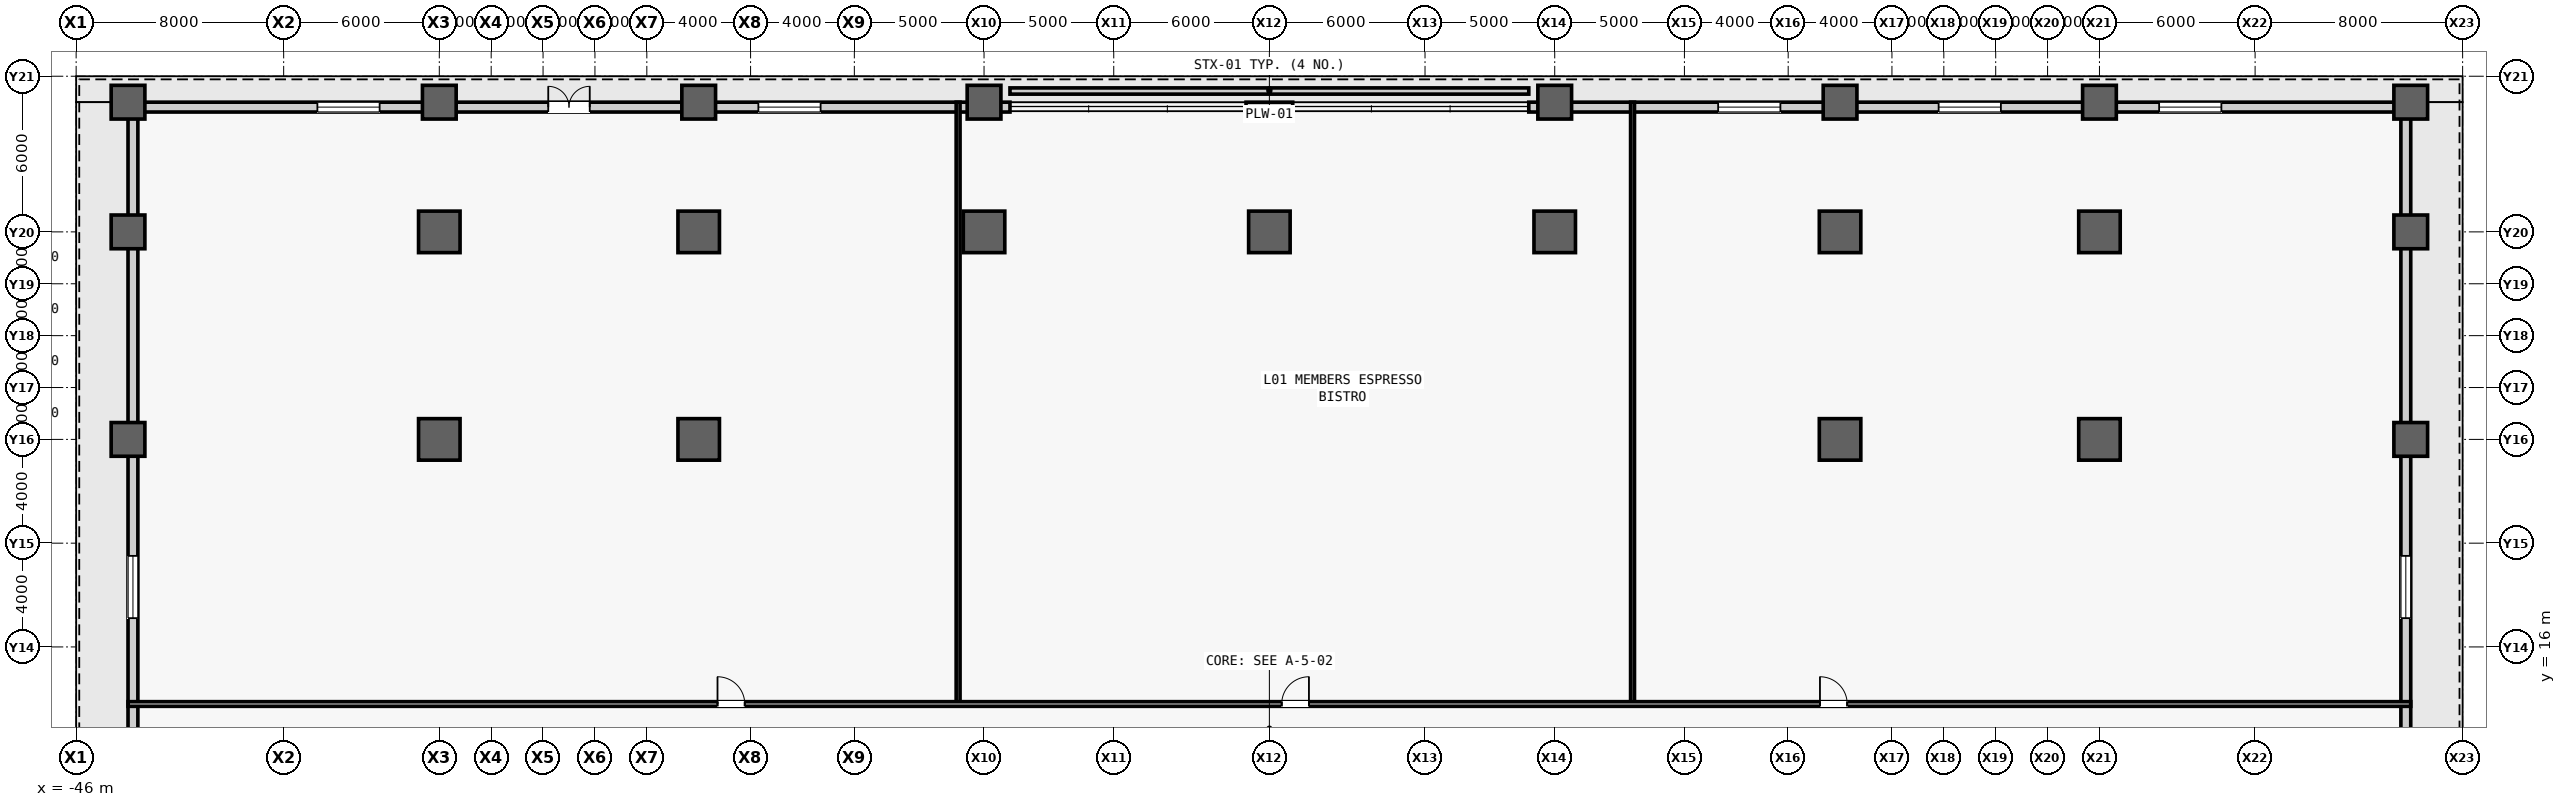
"""IFC4 building model, lengths in metres.
Left out: names, types, materials, properties, quantities, classifications, styles, units other than length and angle.
Written with IfcOpenShell. Run it as: python <this file> out.ifc"""

import sys

from ifc_helpers import new_model, si_unit, direction, frame, frame_2d, origin, origin_2d, place, context, subcontext, project, spatial, rectangle, extrude, source, transform, mapped, element, fill, save


model = new_model("IFC4")
c1 = context("Model", 3, precision=1e-05, world=origin(), true_north=direction((0.0, 1.0)))
c2 = subcontext(c1, "Body", "Model", "MODEL_VIEW")
j1 = project(units=[si_unit("LENGTHUNIT", "METRE"), si_unit("PLANEANGLEUNIT", "RADIAN")], contexts=[c1])
p1 = place(None, origin())
s1 = spatial("IfcSite", under=j1, at=p1, CompositionType="ELEMENT")
p2 = place(p1, origin())
s2 = spatial("IfcBuilding", under=s1, at=p2, CompositionType="ELEMENT")
p3 = place(p2, frame((0.0, 0.0, 6.6)))
s3 = spatial("IfcBuildingStorey", under=s2, at=p3, CompositionType="ELEMENT", Elevation=6.6)
m1 = source(origin(), c2, "Body", "SweptSolid", [
    extrude(rectangle(XDim=1.3, YDim=1.3, at=origin_2d()), origin(), (0.0, 0.0, 1.0), 5.4),
])
for number, where, z_axis, x_axis in (
    (1, (-44.0, 24.0, 0.0), (0.0, 0.0, 1.0), (1.0, 0.0, 0.0)),
    (2, (-44.0, 37.0, 0.0), (0.0, 0.0, 1.0), (1.0, 0.0, 0.0)),
):
    element("IfcColumn", number, at=place(p3, frame(where, z_axis=z_axis, x_axis=x_axis)), inside=s3, PredefinedType="COLUMN", context=c2, shape_type="MappedRepresentation", body=[
        mapped(m1, transform((0.0, 0.0, 0.0), scale=1.0)),
    ])
m2 = source(origin(), c2, "Body", "SweptSolid", [
    extrude(rectangle(XDim=1.6, YDim=1.6, at=origin_2d()), origin(), (0.0, 0.0, 1.0), 5.4),
])
for number, where, z_axis, x_axis in (
    (3, (-32.0, 24.0, 0.0), (0.0, 0.0, 1.0), (1.0, 0.0, 0.0)),
    (4, (-32.0, 32.0, 0.0), (0.0, 0.0, 1.0), (1.0, 0.0, 0.0)),
):
    element("IfcColumn", number, at=place(p3, frame(where, z_axis=z_axis, x_axis=x_axis)), inside=s3, PredefinedType="COLUMN", context=c2, shape_type="MappedRepresentation", body=[
        mapped(m2, transform((0.0, 0.0, 0.0), scale=1.0)),
    ])
p4 = place(p3, frame((-32.0, 37.0, 0.0), z_axis=(0.0, 0.0, 1.0), x_axis=(1.0, 0.0, 0.0)))
e5 = element("IfcColumn", 5, at=p4, inside=s3, PredefinedType="COLUMN", context=c2, shape_type="MappedRepresentation", body=[
    mapped(m1, transform((0.0, 0.0, 0.0), scale=1.0)),
])
for number, where, z_axis, x_axis in (
    (6, (-22.0, 24.0, 0.0), (0.0, 0.0, 1.0), (1.0, 0.0, 0.0)),
    (7, (-22.0, 32.0, 0.0), (0.0, 0.0, 1.0), (1.0, 0.0, 0.0)),
):
    element("IfcColumn", number, at=place(p3, frame(where, z_axis=z_axis, x_axis=x_axis)), inside=s3, PredefinedType="COLUMN", context=c2, shape_type="MappedRepresentation", body=[
        mapped(m2, transform((0.0, 0.0, 0.0), scale=1.0)),
    ])
p5 = place(p3, frame((-22.0, 37.0, 0.0), z_axis=(0.0, 0.0, 1.0), x_axis=(1.0, 0.0, 0.0)))
e8 = element("IfcColumn", 8, at=p5, inside=s3, PredefinedType="COLUMN", context=c2, shape_type="MappedRepresentation", body=[
    mapped(m1, transform((0.0, 0.0, 0.0), scale=1.0)),
])
p6 = place(p3, frame((-11.0, 32.0, 0.0), z_axis=(0.0, 0.0, 1.0), x_axis=(1.0, 0.0, 0.0)))
e9 = element("IfcColumn", 9, at=p6, inside=s3, PredefinedType="COLUMN", context=c2, shape_type="MappedRepresentation", body=[
    mapped(m2, transform((0.0, 0.0, 0.0), scale=1.0)),
])
p7 = place(p3, frame((-11.0, 37.0, 0.0), z_axis=(0.0, 0.0, 1.0), x_axis=(1.0, 0.0, 0.0)))
e10 = element("IfcColumn", 10, at=p7, inside=s3, PredefinedType="COLUMN", context=c2, shape_type="MappedRepresentation", body=[
    mapped(m1, transform((0.0, 0.0, 0.0), scale=1.0)),
])
for number, where, z_axis, x_axis in (
    (11, (0.0, 32.0, 0.0), (0.0, 0.0, 1.0), (1.0, 0.0, 0.0)),
    (12, (11.0, 32.0, 0.0), (0.0, 0.0, 1.0), (1.0, 0.0, 0.0)),
):
    element("IfcColumn", number, at=place(p3, frame(where, z_axis=z_axis, x_axis=x_axis)), inside=s3, PredefinedType="COLUMN", context=c2, shape_type="MappedRepresentation", body=[
        mapped(m2, transform((0.0, 0.0, 0.0), scale=1.0)),
    ])
p8 = place(p3, frame((11.0, 37.0, 0.0), z_axis=(0.0, 0.0, 1.0), x_axis=(1.0, 0.0, 0.0)))
e13 = element("IfcColumn", 13, at=p8, inside=s3, PredefinedType="COLUMN", context=c2, shape_type="MappedRepresentation", body=[
    mapped(m1, transform((0.0, 0.0, 0.0), scale=1.0)),
])
for number, where, z_axis, x_axis in (
    (14, (22.0, 24.0, 0.0), (0.0, 0.0, 1.0), (1.0, 0.0, 0.0)),
    (15, (22.0, 32.0, 0.0), (0.0, 0.0, 1.0), (1.0, 0.0, 0.0)),
):
    element("IfcColumn", number, at=place(p3, frame(where, z_axis=z_axis, x_axis=x_axis)), inside=s3, PredefinedType="COLUMN", context=c2, shape_type="MappedRepresentation", body=[
        mapped(m2, transform((0.0, 0.0, 0.0), scale=1.0)),
    ])
p9 = place(p3, frame((22.0, 37.0, 0.0), z_axis=(0.0, 0.0, 1.0), x_axis=(1.0, 0.0, 0.0)))
e16 = element("IfcColumn", 16, at=p9, inside=s3, PredefinedType="COLUMN", context=c2, shape_type="MappedRepresentation", body=[
    mapped(m1, transform((0.0, 0.0, 0.0), scale=1.0)),
])
for number, where, z_axis, x_axis in (
    (17, (32.0, 24.0, 0.0), (0.0, 0.0, 1.0), (1.0, 0.0, 0.0)),
    (18, (32.0, 32.0, 0.0), (0.0, 0.0, 1.0), (1.0, 0.0, 0.0)),
):
    element("IfcColumn", number, at=place(p3, frame(where, z_axis=z_axis, x_axis=x_axis)), inside=s3, PredefinedType="COLUMN", context=c2, shape_type="MappedRepresentation", body=[
        mapped(m2, transform((0.0, 0.0, 0.0), scale=1.0)),
    ])
for number, where, z_axis, x_axis in (
    (19, (32.0, 37.0, 0.0), (0.0, 0.0, 1.0), (1.0, 0.0, 0.0)),
    (20, (44.0, 24.0, 0.0), (0.0, 0.0, 1.0), (1.0, 0.0, 0.0)),
    (21, (44.0, 37.0, 0.0), (0.0, 0.0, 1.0), (1.0, 0.0, 0.0)),
    (22, (-44.0, 32.0, 0.0), (0.0, 0.0, 1.0), (1.0, 0.0, 0.0)),
    (23, (44.0, 32.0, 0.0), (0.0, 0.0, 1.0), (1.0, 0.0, 0.0)),
):
    element("IfcColumn", number, at=place(p3, frame(where, z_axis=z_axis, x_axis=x_axis)), inside=s3, PredefinedType="COLUMN", context=c2, shape_type="MappedRepresentation", body=[
        mapped(m1, transform((0.0, 0.0, 0.0), scale=1.0)),
    ])
m3 = source(origin(), c2, "Body", "SweptSolid", [
    extrude(rectangle(XDim=34.0, YDim=0.38, at=frame_2d((17.0, 0.0))), origin(), (0.0, 0.0, 1.0), 3.28),
])
p10 = place(p3, frame((-44.0, 36.81, 0.0), z_axis=(0.0, 0.0, 1.0), x_axis=(1.0, 0.0, 0.0)))
e24 = element("IfcWall", 24, at=p10, inside=s3, PredefinedType="STANDARD", context=c2, shape_type="MappedRepresentation", body=[
    mapped(m3, transform((0.0, 0.0, 0.0), scale=1.0)),
])
m4 = source(origin(), c2, "Body", "SweptSolid", [
    extrude(rectangle(XDim=1.6, YDim=2.25, at=frame_2d((0.8, 1.125))), frame((0.0, 0.2, 0.0), z_axis=(0.0, -1.0, 0.0), x_axis=(1.0, 0.0, 0.0)), (0.0, 0.0, 1.0), 0.4),
])
p11 = place(p10, frame((16.2, 0.0, 0.0)))
e25 = element("IfcOpeningElement", 25, at=p11, cuts=e24, PredefinedType="OPENING", context=c2, shape_type="MappedRepresentation", body=[
    mapped(m4, transform((0.0, 0.0, 0.0), scale=1.0)),
])
m5 = source(origin(), c2, "Body", "SweptSolid", [
    extrude(rectangle(XDim=2.4, YDim=2.56, at=frame_2d((1.2, 1.28))), frame((0.0, 0.2, 0.0), z_axis=(0.0, -1.0, 0.0), x_axis=(1.0, 0.0, 0.0)), (0.0, 0.0, 1.0), 0.4),
])
p12 = place(p10, frame((7.3, 0.0, 0.5)))
e26 = element("IfcOpeningElement", 26, at=p12, cuts=e24, PredefinedType="OPENING", context=c2, shape_type="MappedRepresentation", body=[
    mapped(m5, transform((0.0, 0.0, 0.0), scale=1.0)),
])
p13 = place(p10, frame((24.3, 0.0, 0.5)))
e27 = element("IfcOpeningElement", 27, at=p13, cuts=e24, PredefinedType="OPENING", context=c2, shape_type="MappedRepresentation", body=[
    mapped(m5, transform((0.0, 0.0, 0.0), scale=1.0)),
])
m6 = source(origin(), c2, "Body", "SweptSolid", [
    extrude(rectangle(XDim=1.8, YDim=0.38, at=frame_2d((0.9, 0.0))), origin(), (0.0, 0.0, 1.0), 3.28),
])
p14 = place(p3, frame((-0.9, 36.81, 0.0), z_axis=(0.0, 0.0, 1.0), x_axis=(1.0, 0.0, 0.0)))
e28 = element("IfcWall", 28, at=p14, inside=s3, PredefinedType="STANDARD", context=c2, shape_type="MappedRepresentation", body=[
    mapped(m6, transform((0.0, 0.0, 0.0), scale=1.0)),
])
p15 = place(p3, frame((10.0, 36.81, 0.0), z_axis=(0.0, 0.0, 1.0), x_axis=(1.0, 0.0, 0.0)))
e29 = element("IfcWall", 29, at=p15, inside=s3, PredefinedType="STANDARD", context=c2, shape_type="MappedRepresentation", body=[
    mapped(m3, transform((0.0, 0.0, 0.0), scale=1.0)),
])
p16 = place(p15, frame((7.3, 0.0, 0.5)))
e30 = element("IfcOpeningElement", 30, at=p16, cuts=e29, PredefinedType="OPENING", context=c2, shape_type="MappedRepresentation", body=[
    mapped(m5, transform((0.0, 0.0, 0.0), scale=1.0)),
])
p17 = place(p15, frame((15.8, 0.0, 0.5)))
e31 = element("IfcOpeningElement", 31, at=p17, cuts=e29, PredefinedType="OPENING", context=c2, shape_type="MappedRepresentation", body=[
    mapped(m5, transform((0.0, 0.0, 0.0), scale=1.0)),
])
p18 = place(p15, frame((24.3, 0.0, 0.5)))
e32 = element("IfcOpeningElement", 32, at=p18, cuts=e29, PredefinedType="OPENING", context=c2, shape_type="MappedRepresentation", body=[
    mapped(m5, transform((0.0, 0.0, 0.0), scale=1.0)),
])
m7 = source(origin(), c2, "Body", "SweptSolid", [
    extrude(rectangle(XDim=73.24, YDim=0.38, at=frame_2d((36.62, 0.0))), origin(), (0.0, 0.0, 1.0), 3.28),
])
p19 = place(p3, frame((-43.81, -36.62, 0.0), z_axis=(0.0, 0.0, 1.0), x_axis=(0.0, 1.0, 0.0)))
e33 = element("IfcWall", 33, at=p19, inside=s3, PredefinedType="STANDARD", context=c2, shape_type="MappedRepresentation", body=[
    mapped(m7, transform((0.0, 0.0, 0.0), scale=1.0)),
])
p20 = place(p19, frame((41.82, 0.0, 0.0)))
e34 = element("IfcOpeningElement", 34, at=p20, cuts=e33, PredefinedType="OPENING", context=c2, shape_type="MappedRepresentation", body=[
    mapped(m4, transform((0.0, 0.0, 0.0), scale=1.0)),
])
p21 = place(p19, frame((17.11, 0.0, 0.5)))
e35 = element("IfcOpeningElement", 35, at=p21, cuts=e33, PredefinedType="OPENING", context=c2, shape_type="MappedRepresentation", body=[
    mapped(m5, transform((0.0, 0.0, 0.0), scale=1.0)),
])
p22 = place(p19, frame((53.73, 0.0, 0.5)))
e36 = element("IfcOpeningElement", 36, at=p22, cuts=e33, PredefinedType="OPENING", context=c2, shape_type="MappedRepresentation", body=[
    mapped(m5, transform((0.0, 0.0, 0.0), scale=1.0)),
])
p23 = place(p3, frame((43.81, -36.62, 0.0), z_axis=(0.0, 0.0, 1.0), x_axis=(0.0, 1.0, 0.0)))
e37 = element("IfcWall", 37, at=p23, inside=s3, PredefinedType="STANDARD", context=c2, shape_type="MappedRepresentation", body=[
    mapped(m7, transform((0.0, 0.0, 0.0), scale=1.0)),
])
p24 = place(p23, frame((41.82, 0.0, 0.0)))
e38 = element("IfcOpeningElement", 38, at=p24, cuts=e37, PredefinedType="OPENING", context=c2, shape_type="MappedRepresentation", body=[
    mapped(m4, transform((0.0, 0.0, 0.0), scale=1.0)),
])
p25 = place(p23, frame((17.11, 0.0, 0.5)))
e39 = element("IfcOpeningElement", 39, at=p25, cuts=e37, PredefinedType="OPENING", context=c2, shape_type="MappedRepresentation", body=[
    mapped(m5, transform((0.0, 0.0, 0.0), scale=1.0)),
])
p26 = place(p23, frame((53.73, 0.0, 0.5)))
e40 = element("IfcOpeningElement", 40, at=p26, cuts=e37, PredefinedType="OPENING", context=c2, shape_type="MappedRepresentation", body=[
    mapped(m5, transform((0.0, 0.0, 0.0), scale=1.0)),
])
m8 = source(origin(), c2, "Body", "SweptSolid", [
    extrude(rectangle(XDim=20.0, YDim=0.24, at=frame_2d((10.0, 0.0))), origin(), (0.0, 0.0, 1.0), 0.65),
])
p27 = place(p3, frame((-10.0, 37.43, 0.0), z_axis=(0.0, 0.0, 1.0), x_axis=(1.0, 0.0, 0.0)))
e41 = element("IfcWall", 41, at=p27, inside=s3, PredefinedType="STANDARD", context=c2, shape_type="MappedRepresentation", body=[
    mapped(m8, transform((0.0, 0.0, 0.0), scale=1.0)),
])
m9 = source(origin(), c2, "Body", "SweptSolid", [
    extrude(rectangle(XDim=23.2, YDim=0.15, at=frame_2d((11.6, 0.0))), origin(), (0.0, 0.0, 1.0), 5.08),
])
for number, where, z_axis, x_axis in (
    (42, (-12.0, 13.8, 0.0), (0.0, 0.0, 1.0), (0.0, 1.0, 0.0)),
    (43, (14.0, 13.8, 0.0), (0.0, 0.0, 1.0), (0.0, 1.0, 0.0)),
):
    element("IfcWall", number, at=place(p3, frame(where, z_axis=z_axis, x_axis=x_axis)), inside=s3, PredefinedType="PARTITIONING", context=c2, shape_type="MappedRepresentation", body=[
        mapped(m9, transform((0.0, 0.0, 0.0), scale=1.0)),
    ])
m10 = source(origin(), c2, "Body", "SweptSolid", [
    extrude(rectangle(XDim=88.0, YDim=0.18, at=frame_2d((44.0, 0.0))), origin(), (0.0, 0.0, 1.0), 5.08),
])
p28 = place(p3, frame((-44.0, 13.8, 0.0), z_axis=(0.0, 0.0, 1.0), x_axis=(1.0, 0.0, 0.0)))
e44 = element("IfcWall", 44, at=p28, inside=s3, PredefinedType="PARTITIONING", context=c2, shape_type="MappedRepresentation", body=[
    mapped(m10, transform((0.0, 0.0, 0.0), scale=1.0)),
])
m11 = source(origin(), c2, "Body", "SweptSolid", [
    extrude(rectangle(XDim=1.05, YDim=2.2, at=frame_2d((0.525, 1.1))), frame((0.0, 0.1, 0.0), z_axis=(0.0, -1.0, 0.0), x_axis=(1.0, 0.0, 0.0)), (0.0, 0.0, 1.0), 0.2),
])
p29 = place(p28, frame((22.725, 0.0, 0.0)))
e45 = element("IfcOpeningElement", 45, at=p29, cuts=e44, PredefinedType="OPENING", context=c2, shape_type="MappedRepresentation", body=[
    mapped(m11, transform((0.0, 0.0, 0.0), scale=1.0)),
])
p30 = place(p28, frame((44.475, 0.0, 0.0)))
e46 = element("IfcOpeningElement", 46, at=p30, cuts=e44, PredefinedType="OPENING", context=c2, shape_type="MappedRepresentation", body=[
    mapped(m11, transform((0.0, 0.0, 0.0), scale=1.0)),
])
p31 = place(p28, frame((65.225, 0.0, 0.0)))
e47 = element("IfcOpeningElement", 47, at=p31, cuts=e44, PredefinedType="OPENING", context=c2, shape_type="MappedRepresentation", body=[
    mapped(m11, transform((0.0, 0.0, 0.0), scale=1.0)),
])
m12 = source(origin(), c2, "Body", "SweptSolid", [
    extrude(rectangle(XDim=1.6, YDim=2.25, at=frame_2d((0.8, 1.125))), frame((0.0, 0.025, 0.0), z_axis=(0.0, -1.0, 0.0), x_axis=(1.0, 0.0, 0.0)), (0.0, 0.0, 1.0), 0.05),
])
p32 = place(p11, origin())
e48 = element("IfcDoor", 48, at=p32, inside=s3, OperationType="DOUBLE_DOOR_SINGLE_SWING", PredefinedType="DOOR", context=c2, shape_type="MappedRepresentation", body=[
    mapped(m12, transform((0.0, 0.0, 0.0), scale=1.0)),
])
fill(e25, e48)
m13 = source(origin(), c2, "Body", "SweptSolid", [
    extrude(rectangle(XDim=2.4, YDim=2.56, at=frame_2d((1.2, 1.28))), frame((0.0, 0.03, 0.0), z_axis=(0.0, -1.0, 0.0), x_axis=(1.0, 0.0, 0.0)), (0.0, 0.0, 1.0), 0.06),
])
p33 = place(p12, origin())
e49 = element("IfcWindow", 49, at=p33, inside=s3, PartitioningType="SINGLE_PANEL", PredefinedType="WINDOW", context=c2, shape_type="MappedRepresentation", body=[
    mapped(m13, transform((0.0, 0.0, 0.0), scale=1.0)),
])
fill(e26, e49)
p34 = place(p13, origin())
e50 = element("IfcWindow", 50, at=p34, inside=s3, PartitioningType="SINGLE_PANEL", PredefinedType="WINDOW", context=c2, shape_type="MappedRepresentation", body=[
    mapped(m13, transform((0.0, 0.0, 0.0), scale=1.0)),
])
fill(e27, e50)
p35 = place(p16, origin())
e51 = element("IfcWindow", 51, at=p35, inside=s3, PartitioningType="SINGLE_PANEL", PredefinedType="WINDOW", context=c2, shape_type="MappedRepresentation", body=[
    mapped(m13, transform((0.0, 0.0, 0.0), scale=1.0)),
])
fill(e30, e51)
p36 = place(p17, origin())
e52 = element("IfcWindow", 52, at=p36, inside=s3, PartitioningType="SINGLE_PANEL", PredefinedType="WINDOW", context=c2, shape_type="MappedRepresentation", body=[
    mapped(m13, transform((0.0, 0.0, 0.0), scale=1.0)),
])
fill(e31, e52)
p37 = place(p18, origin())
e53 = element("IfcWindow", 53, at=p37, inside=s3, PartitioningType="SINGLE_PANEL", PredefinedType="WINDOW", context=c2, shape_type="MappedRepresentation", body=[
    mapped(m13, transform((0.0, 0.0, 0.0), scale=1.0)),
])
fill(e32, e53)
p38 = place(p22, origin())
e54 = element("IfcWindow", 54, at=p38, inside=s3, PartitioningType="SINGLE_PANEL", PredefinedType="WINDOW", context=c2, shape_type="MappedRepresentation", body=[
    mapped(m13, transform((0.0, 0.0, 0.0), scale=1.0)),
])
fill(e36, e54)
p39 = place(p26, origin())
e55 = element("IfcWindow", 55, at=p39, inside=s3, PartitioningType="SINGLE_PANEL", PredefinedType="WINDOW", context=c2, shape_type="MappedRepresentation", body=[
    mapped(m13, transform((0.0, 0.0, 0.0), scale=1.0)),
])
fill(e40, e55)
m14 = source(origin(), c2, "Body", "SweptSolid", [
    extrude(rectangle(XDim=1.05, YDim=2.2, at=frame_2d((0.525, 1.1))), frame((0.0, 0.025, 0.0), z_axis=(0.0, -1.0, 0.0), x_axis=(1.0, 0.0, 0.0)), (0.0, 0.0, 1.0), 0.05),
])
p40 = place(p29, origin())
e56 = element("IfcDoor", 56, at=p40, inside=s3, OperationType="SINGLE_SWING_LEFT", PredefinedType="DOOR", context=c2, shape_type="MappedRepresentation", body=[
    mapped(m14, transform((0.0, 0.0, 0.0), scale=1.0)),
])
fill(e45, e56)
p41 = place(p30, origin())
e57 = element("IfcDoor", 57, at=p41, inside=s3, OperationType="SINGLE_SWING_RIGHT", PredefinedType="DOOR", context=c2, shape_type="MappedRepresentation", body=[
    mapped(m14, transform((0.0, 0.0, 0.0), scale=1.0)),
])
fill(e46, e57)
p42 = place(p31, origin())
e58 = element("IfcDoor", 58, at=p42, inside=s3, OperationType="SINGLE_SWING_LEFT", PredefinedType="DOOR", context=c2, shape_type="MappedRepresentation", body=[
    mapped(m14, transform((0.0, 0.0, 0.0), scale=1.0)),
])
fill(e47, e58)
save(model, sys.argv[1])
